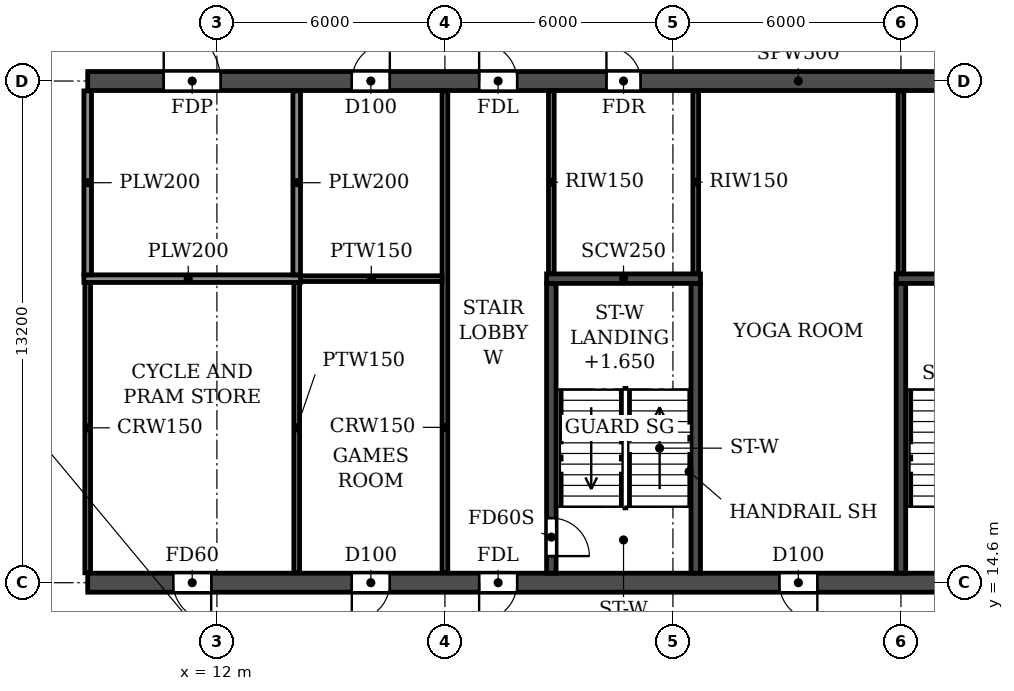
"""IFC4 building model, lengths in metres.
Left out: names, types, materials, properties, quantities, classifications, styles, units other than length and angle.
Written with IfcOpenShell. Run it as: python <this file> out.ifc"""

import sys

from ifc_helpers import new_model, si_unit, direction, frame, frame_2d, origin, place, context, subcontext, project, spatial, rectangle, extrude, element, fill, save


model = new_model("IFC4")
c1 = context("Model", 3, precision=1e-05, world=origin(), true_north=direction((0.0, 1.0)))
c2 = subcontext(c1, "Body", "Model", "MODEL_VIEW")
j1 = project(units=[si_unit("LENGTHUNIT", "METRE"), si_unit("PLANEANGLEUNIT", "RADIAN")], contexts=[c1])
p1 = place(None, origin())
s1 = spatial("IfcSite", under=j1, at=p1, CompositionType="ELEMENT")
p2 = place(p1, origin())
s2 = spatial("IfcBuilding", under=s1, at=p2, CompositionType="ELEMENT")
p3 = place(p2, frame((0.0, 0.0, 72.9)))
s3 = spatial("IfcBuildingStorey", under=s2, at=p3, CompositionType="ELEMENT", Elevation=72.9)
p4 = place(p3, frame((8.6, 14.6, 0.0), z_axis=(0.0, 0.0, 1.0), x_axis=(1.0, 0.0, 0.0)))
e1 = element("IfcWall", 1, at=p4, inside=s3, PredefinedType="SOLIDWALL", context=c2, shape_type="SweptSolid", body=[
    extrude(rectangle(XDim=84.8, YDim=0.5, at=frame_2d((42.4, 0.0))), origin(), (0.0, 0.0, 1.0), 3.06),
])
p5 = place(p4, frame((2.25, 0.0, 0.0)))
e2 = element("IfcOpeningElement", 2, at=p5, cuts=e1, PredefinedType="OPENING", context=c2, shape_type="SweptSolid", body=[
    extrude(rectangle(XDim=1.0, YDim=2.1, at=frame_2d((0.5, 1.05))), frame((0.0, 0.26, 0.0), z_axis=(0.0, -1.0, 0.0), x_axis=(1.0, 0.0, 0.0)), (0.0, 0.0, 1.0), 0.52),
])
p6 = place(p4, frame((6.95, 0.0, 0.0)))
e3 = element("IfcOpeningElement", 3, at=p6, cuts=e1, PredefinedType="OPENING", context=c2, shape_type="SweptSolid", body=[
    extrude(rectangle(XDim=1.0, YDim=2.1, at=frame_2d((0.5, 1.05))), frame((0.0, 0.26, 0.0), z_axis=(0.0, -1.0, 0.0), x_axis=(1.0, 0.0, 0.0)), (0.0, 0.0, 1.0), 0.52),
])
p7 = place(p4, frame((10.3, 0.0, 0.0)))
e4 = element("IfcOpeningElement", 4, at=p7, cuts=e1, PredefinedType="OPENING", context=c2, shape_type="SweptSolid", body=[
    extrude(rectangle(XDim=1.0, YDim=2.1, at=frame_2d((0.5, 1.05))), frame((0.0, 0.26, 0.0), z_axis=(0.0, -1.0, 0.0), x_axis=(1.0, 0.0, 0.0)), (0.0, 0.0, 1.0), 0.52),
])
p8 = place(p4, frame((18.2, 0.0, 0.0)))
e5 = element("IfcOpeningElement", 5, at=p8, cuts=e1, PredefinedType="OPENING", context=c2, shape_type="SweptSolid", body=[
    extrude(rectangle(XDim=1.0, YDim=2.1, at=frame_2d((0.5, 1.05))), frame((0.0, 0.26, 0.0), z_axis=(0.0, -1.0, 0.0), x_axis=(1.0, 0.0, 0.0)), (0.0, 0.0, 1.0), 0.52),
])
p9 = place(p4, frame((22.8, 0.0, 0.0)))
e6 = element("IfcOpeningElement", 6, at=p9, cuts=e1, PredefinedType="OPENING", context=c2, shape_type="SweptSolid", body=[
    extrude(rectangle(XDim=1.0, YDim=2.1, at=frame_2d((0.5, 1.05))), frame((0.0, 0.26, 0.0), z_axis=(0.0, -1.0, 0.0), x_axis=(1.0, 0.0, 0.0)), (0.0, 0.0, 1.0), 0.52),
])
p10 = place(p4, frame((35.4, 0.0, 0.0)))
e7 = element("IfcOpeningElement", 7, at=p10, cuts=e1, PredefinedType="OPENING", context=c2, shape_type="SweptSolid", body=[
    extrude(rectangle(XDim=1.0, YDim=2.1, at=frame_2d((0.5, 1.05))), frame((0.0, 0.26, 0.0), z_axis=(0.0, -1.0, 0.0), x_axis=(1.0, 0.0, 0.0)), (0.0, 0.0, 1.0), 0.52),
])
p11 = place(p4, frame((39.3, 0.0, 0.0)))
e8 = element("IfcOpeningElement", 8, at=p11, cuts=e1, PredefinedType="OPENING", context=c2, shape_type="SweptSolid", body=[
    extrude(rectangle(XDim=1.0, YDim=2.1, at=frame_2d((0.5, 1.05))), frame((0.0, 0.26, 0.0), z_axis=(0.0, -1.0, 0.0), x_axis=(1.0, 0.0, 0.0)), (0.0, 0.0, 1.0), 0.52),
])
p12 = place(p4, frame((41.9, 0.0, 0.0)))
e9 = element("IfcOpeningElement", 9, at=p12, cuts=e1, PredefinedType="OPENING", context=c2, shape_type="SweptSolid", body=[
    extrude(rectangle(XDim=1.0, YDim=2.1, at=frame_2d((0.5, 1.05))), frame((0.0, 0.26, 0.0), z_axis=(0.0, -1.0, 0.0), x_axis=(1.0, 0.0, 0.0)), (0.0, 0.0, 1.0), 0.52),
])
p13 = place(p4, frame((44.5, 0.0, 0.0)))
e10 = element("IfcOpeningElement", 10, at=p13, cuts=e1, PredefinedType="OPENING", context=c2, shape_type="SweptSolid", body=[
    extrude(rectangle(XDim=1.0, YDim=2.1, at=frame_2d((0.5, 1.05))), frame((0.0, 0.26, 0.0), z_axis=(0.0, -1.0, 0.0), x_axis=(1.0, 0.0, 0.0)), (0.0, 0.0, 1.0), 0.52),
])
p14 = place(p4, frame((48.4, 0.0, 0.0)))
e11 = element("IfcOpeningElement", 11, at=p14, cuts=e1, PredefinedType="OPENING", context=c2, shape_type="SweptSolid", body=[
    extrude(rectangle(XDim=1.0, YDim=2.1, at=frame_2d((0.5, 1.05))), frame((0.0, 0.26, 0.0), z_axis=(0.0, -1.0, 0.0), x_axis=(1.0, 0.0, 0.0)), (0.0, 0.0, 1.0), 0.52),
])
p15 = place(p4, frame((61.0, 0.0, 0.0)))
e12 = element("IfcOpeningElement", 12, at=p15, cuts=e1, PredefinedType="OPENING", context=c2, shape_type="SweptSolid", body=[
    extrude(rectangle(XDim=1.0, YDim=2.1, at=frame_2d((0.5, 1.05))), frame((0.0, 0.26, 0.0), z_axis=(0.0, -1.0, 0.0), x_axis=(1.0, 0.0, 0.0)), (0.0, 0.0, 1.0), 0.52),
])
p16 = place(p4, frame((65.6, 0.0, 0.0)))
e13 = element("IfcOpeningElement", 13, at=p16, cuts=e1, PredefinedType="OPENING", context=c2, shape_type="SweptSolid", body=[
    extrude(rectangle(XDim=1.0, YDim=2.1, at=frame_2d((0.5, 1.05))), frame((0.0, 0.26, 0.0), z_axis=(0.0, -1.0, 0.0), x_axis=(1.0, 0.0, 0.0)), (0.0, 0.0, 1.0), 0.52),
])
p17 = place(p4, frame((73.5, 0.0, 0.0)))
e14 = element("IfcOpeningElement", 14, at=p17, cuts=e1, PredefinedType="OPENING", context=c2, shape_type="SweptSolid", body=[
    extrude(rectangle(XDim=1.0, YDim=2.1, at=frame_2d((0.5, 1.05))), frame((0.0, 0.26, 0.0), z_axis=(0.0, -1.0, 0.0), x_axis=(1.0, 0.0, 0.0)), (0.0, 0.0, 1.0), 0.52),
])
p18 = place(p4, frame((76.55, 0.0, 0.0)))
e15 = element("IfcOpeningElement", 15, at=p18, cuts=e1, PredefinedType="OPENING", context=c2, shape_type="SweptSolid", body=[
    extrude(rectangle(XDim=1.0, YDim=2.1, at=frame_2d((0.5, 1.05))), frame((0.0, 0.26, 0.0), z_axis=(0.0, -1.0, 0.0), x_axis=(1.0, 0.0, 0.0)), (0.0, 0.0, 1.0), 0.52),
])
p19 = place(p4, frame((81.0, 0.0, 0.0)))
e16 = element("IfcOpeningElement", 16, at=p19, cuts=e1, PredefinedType="OPENING", context=c2, shape_type="SweptSolid", body=[
    extrude(rectangle(XDim=1.5, YDim=2.1, at=frame_2d((0.75, 1.05))), frame((0.0, 0.26, 0.0), z_axis=(0.0, -1.0, 0.0), x_axis=(1.0, 0.0, 0.0)), (0.0, 0.0, 1.0), 0.52),
])
p20 = place(p3, frame((8.6, 27.8, 0.0), z_axis=(0.0, 0.0, 1.0), x_axis=(1.0, 0.0, 0.0)))
e17 = element("IfcWall", 17, at=p20, inside=s3, PredefinedType="SOLIDWALL", context=c2, shape_type="SweptSolid", body=[
    extrude(rectangle(XDim=84.8, YDim=0.5, at=frame_2d((42.4, 0.0))), origin(), (0.0, 0.0, 1.0), 3.06),
])
p21 = place(p20, frame((2.0, 0.0, 0.0)))
e18 = element("IfcOpeningElement", 18, at=p21, cuts=e17, PredefinedType="OPENING", context=c2, shape_type="SweptSolid", body=[
    extrude(rectangle(XDim=1.5, YDim=2.1, at=frame_2d((0.75, 1.05))), frame((0.0, 0.26, 0.0), z_axis=(0.0, -1.0, 0.0), x_axis=(1.0, 0.0, 0.0)), (0.0, 0.0, 1.0), 0.52),
])
p22 = place(p20, frame((6.95, 0.0, 0.0)))
e19 = element("IfcOpeningElement", 19, at=p22, cuts=e17, PredefinedType="OPENING", context=c2, shape_type="SweptSolid", body=[
    extrude(rectangle(XDim=1.0, YDim=2.1, at=frame_2d((0.5, 1.05))), frame((0.0, 0.26, 0.0), z_axis=(0.0, -1.0, 0.0), x_axis=(1.0, 0.0, 0.0)), (0.0, 0.0, 1.0), 0.52),
])
p23 = place(p20, frame((10.3, 0.0, 0.0)))
e20 = element("IfcOpeningElement", 20, at=p23, cuts=e17, PredefinedType="OPENING", context=c2, shape_type="SweptSolid", body=[
    extrude(rectangle(XDim=1.0, YDim=2.1, at=frame_2d((0.5, 1.05))), frame((0.0, 0.26, 0.0), z_axis=(0.0, -1.0, 0.0), x_axis=(1.0, 0.0, 0.0)), (0.0, 0.0, 1.0), 0.52),
])
p24 = place(p20, frame((13.65, 0.0, 0.0)))
e21 = element("IfcOpeningElement", 21, at=p24, cuts=e17, PredefinedType="OPENING", context=c2, shape_type="SweptSolid", body=[
    extrude(rectangle(XDim=0.9, YDim=2.1, at=frame_2d((0.45, 1.05))), frame((0.0, 0.26, 0.0), z_axis=(0.0, -1.0, 0.0), x_axis=(1.0, 0.0, 0.0)), (0.0, 0.0, 1.0), 0.52),
])
p25 = place(p20, frame((22.85, 0.0, 0.0)))
e22 = element("IfcOpeningElement", 22, at=p25, cuts=e17, PredefinedType="OPENING", context=c2, shape_type="SweptSolid", body=[
    extrude(rectangle(XDim=0.9, YDim=2.1, at=frame_2d((0.45, 1.05))), frame((0.0, 0.26, 0.0), z_axis=(0.0, -1.0, 0.0), x_axis=(1.0, 0.0, 0.0)), (0.0, 0.0, 1.0), 0.52),
])
p26 = place(p20, frame((26.0, 0.0, 0.0)))
e23 = element("IfcOpeningElement", 23, at=p26, cuts=e17, PredefinedType="OPENING", context=c2, shape_type="SweptSolid", body=[
    extrude(rectangle(XDim=1.0, YDim=2.1, at=frame_2d((0.5, 1.05))), frame((0.0, 0.26, 0.0), z_axis=(0.0, -1.0, 0.0), x_axis=(1.0, 0.0, 0.0)), (0.0, 0.0, 1.0), 0.52),
])
p27 = place(p20, frame((31.2, 0.0, 0.0)))
e24 = element("IfcOpeningElement", 24, at=p27, cuts=e17, PredefinedType="OPENING", context=c2, shape_type="SweptSolid", body=[
    extrude(rectangle(XDim=1.0, YDim=2.1, at=frame_2d((0.5, 1.05))), frame((0.0, 0.26, 0.0), z_axis=(0.0, -1.0, 0.0), x_axis=(1.0, 0.0, 0.0)), (0.0, 0.0, 1.0), 0.52),
])
p28 = place(p20, frame((39.0, 0.0, 0.0)))
e25 = element("IfcOpeningElement", 25, at=p28, cuts=e17, PredefinedType="OPENING", context=c2, shape_type="SweptSolid", body=[
    extrude(rectangle(XDim=1.0, YDim=2.1, at=frame_2d((0.5, 1.05))), frame((0.0, 0.26, 0.0), z_axis=(0.0, -1.0, 0.0), x_axis=(1.0, 0.0, 0.0)), (0.0, 0.0, 1.0), 0.52),
])
p29 = place(p20, frame((41.9, 0.0, 0.0)))
e26 = element("IfcOpeningElement", 26, at=p29, cuts=e17, PredefinedType="OPENING", context=c2, shape_type="SweptSolid", body=[
    extrude(rectangle(XDim=1.0, YDim=2.1, at=frame_2d((0.5, 1.05))), frame((0.0, 0.26, 0.0), z_axis=(0.0, -1.0, 0.0), x_axis=(1.0, 0.0, 0.0)), (0.0, 0.0, 1.0), 0.52),
])
p30 = place(p20, frame((44.8, 0.0, 0.0)))
e27 = element("IfcOpeningElement", 27, at=p30, cuts=e17, PredefinedType="OPENING", context=c2, shape_type="SweptSolid", body=[
    extrude(rectangle(XDim=1.0, YDim=2.1, at=frame_2d((0.5, 1.05))), frame((0.0, 0.26, 0.0), z_axis=(0.0, -1.0, 0.0), x_axis=(1.0, 0.0, 0.0)), (0.0, 0.0, 1.0), 0.52),
])
p31 = place(p20, frame((48.7, 0.0, 0.0)))
e28 = element("IfcOpeningElement", 28, at=p31, cuts=e17, PredefinedType="OPENING", context=c2, shape_type="SweptSolid", body=[
    extrude(rectangle(XDim=1.0, YDim=2.1, at=frame_2d((0.5, 1.05))), frame((0.0, 0.26, 0.0), z_axis=(0.0, -1.0, 0.0), x_axis=(1.0, 0.0, 0.0)), (0.0, 0.0, 1.0), 0.52),
])
p32 = place(p20, frame((55.2, 0.0, 0.0)))
e29 = element("IfcOpeningElement", 29, at=p32, cuts=e17, PredefinedType="OPENING", context=c2, shape_type="SweptSolid", body=[
    extrude(rectangle(XDim=1.0, YDim=2.1, at=frame_2d((0.5, 1.05))), frame((0.0, 0.26, 0.0), z_axis=(0.0, -1.0, 0.0), x_axis=(1.0, 0.0, 0.0)), (0.0, 0.0, 1.0), 0.52),
])
p33 = place(p20, frame((61.05, 0.0, 0.0)))
e30 = element("IfcOpeningElement", 30, at=p33, cuts=e17, PredefinedType="OPENING", context=c2, shape_type="SweptSolid", body=[
    extrude(rectangle(XDim=0.9, YDim=2.1, at=frame_2d((0.45, 1.05))), frame((0.0, 0.26, 0.0), z_axis=(0.0, -1.0, 0.0), x_axis=(1.0, 0.0, 0.0)), (0.0, 0.0, 1.0), 0.52),
])
p34 = place(p20, frame((70.25, 0.0, 0.0)))
e31 = element("IfcOpeningElement", 31, at=p34, cuts=e17, PredefinedType="OPENING", context=c2, shape_type="SweptSolid", body=[
    extrude(rectangle(XDim=0.9, YDim=2.1, at=frame_2d((0.45, 1.05))), frame((0.0, 0.26, 0.0), z_axis=(0.0, -1.0, 0.0), x_axis=(1.0, 0.0, 0.0)), (0.0, 0.0, 1.0), 0.52),
])
p35 = place(p20, frame((73.5, 0.0, 0.0)))
e32 = element("IfcOpeningElement", 32, at=p35, cuts=e17, PredefinedType="OPENING", context=c2, shape_type="SweptSolid", body=[
    extrude(rectangle(XDim=1.0, YDim=2.1, at=frame_2d((0.5, 1.05))), frame((0.0, 0.26, 0.0), z_axis=(0.0, -1.0, 0.0), x_axis=(1.0, 0.0, 0.0)), (0.0, 0.0, 1.0), 0.52),
])
p36 = place(p20, frame((76.25, 0.0, 0.0)))
e33 = element("IfcOpeningElement", 33, at=p36, cuts=e17, PredefinedType="OPENING", context=c2, shape_type="SweptSolid", body=[
    extrude(rectangle(XDim=1.0, YDim=2.1, at=frame_2d((0.5, 1.05))), frame((0.0, 0.26, 0.0), z_axis=(0.0, -1.0, 0.0), x_axis=(1.0, 0.0, 0.0)), (0.0, 0.0, 1.0), 0.52),
])
p37 = place(p20, frame((80.95, 0.0, 0.0)))
e34 = element("IfcOpeningElement", 34, at=p37, cuts=e17, PredefinedType="OPENING", context=c2, shape_type="SweptSolid", body=[
    extrude(rectangle(XDim=1.0, YDim=2.1, at=frame_2d((0.5, 1.05))), frame((0.0, 0.26, 0.0), z_axis=(0.0, -1.0, 0.0), x_axis=(1.0, 0.0, 0.0)), (0.0, 0.0, 1.0), 0.52),
])
p38 = place(p3, frame((30.0, 14.85, 0.0), z_axis=(0.0, 0.0, 1.0), x_axis=(0.0, 1.0, 0.0)))
e35 = element("IfcWall", 35, at=p38, inside=s3, PredefinedType="SOLIDWALL", context=c2, shape_type="SweptSolid", body=[
    extrude(rectangle(XDim=7.625, YDim=0.25, at=frame_2d((3.812, 0.0))), origin(), (0.0, 0.0, 1.0), 3.06),
])
p39 = place(p3, frame((29.875, 22.6, 0.0), z_axis=(0.0, 0.0, 1.0), x_axis=(1.0, 0.0, 0.0)))
e36 = element("IfcWall", 36, at=p39, inside=s3, PredefinedType="SOLIDWALL", context=c2, shape_type="SweptSolid", body=[
    extrude(rectangle(XDim=4.05, YDim=0.25, at=frame_2d((2.025, 0.0))), origin(), (0.0, 0.0, 1.0), 3.06),
])
p40 = place(p3, frame((20.8, 14.85, 0.0), z_axis=(0.0, 0.0, 1.0), x_axis=(0.0, 1.0, 0.0)))
e37 = element("IfcWall", 37, at=p40, inside=s3, PredefinedType="SOLIDWALL", context=c2, shape_type="SweptSolid", body=[
    extrude(rectangle(XDim=7.625, YDim=0.25, at=frame_2d((3.812, 0.0))), origin(), (0.0, 0.0, 1.0), 3.06),
])
p41 = place(p40, frame((0.45, 0.0, 0.0)))
e38 = element("IfcOpeningElement", 38, at=p41, cuts=e37, PredefinedType="OPENING", context=c2, shape_type="SweptSolid", body=[
    extrude(rectangle(XDim=1.0, YDim=2.1, at=frame_2d((0.5, 1.05))), frame((0.0, 0.135, 0.0), z_axis=(0.0, -1.0, 0.0), x_axis=(1.0, 0.0, 0.0)), (0.0, 0.0, 1.0), 0.27),
])
p42 = place(p3, frame((24.6, 14.85, 0.0), z_axis=(0.0, 0.0, 1.0), x_axis=(0.0, 1.0, 0.0)))
e39 = element("IfcWall", 39, at=p42, inside=s3, PredefinedType="SOLIDWALL", context=c2, shape_type="SweptSolid", body=[
    extrude(rectangle(XDim=7.625, YDim=0.25, at=frame_2d((3.812, 0.0))), origin(), (0.0, 0.0, 1.0), 3.06),
])
p43 = place(p3, frame((20.675, 22.6, 0.0), z_axis=(0.0, 0.0, 1.0), x_axis=(1.0, 0.0, 0.0)))
e40 = element("IfcWall", 40, at=p43, inside=s3, PredefinedType="SOLIDWALL", context=c2, shape_type="SweptSolid", body=[
    extrude(rectangle(XDim=4.05, YDim=0.25, at=frame_2d((2.025, 0.0))), origin(), (0.0, 0.0, 1.0), 3.06),
])
p44 = place(p3, frame((8.6, 14.86, 0.0), z_axis=(0.0, 0.0, 1.0), x_axis=(0.0, 1.0, 0.0)))
e41 = element("IfcWall", 41, at=p44, inside=s3, PredefinedType="PARTITIONING", context=c2, shape_type="SweptSolid", body=[
    extrude(rectangle(XDim=7.64, YDim=0.15, at=frame_2d((3.82, 0.0))), origin(), (0.0, 0.0, 1.0), 3.06),
])
p45 = place(p3, frame((18.0, 14.86, 0.0), z_axis=(0.0, 0.0, 1.0), x_axis=(0.0, 1.0, 0.0)))
e42 = element("IfcWall", 42, at=p45, inside=s3, PredefinedType="PARTITIONING", context=c2, shape_type="SweptSolid", body=[
    extrude(rectangle(XDim=12.68, YDim=0.15, at=frame_2d((6.34, 0.0))), origin(), (0.0, 0.0, 1.0), 3.06),
])
p46 = place(p3, frame((14.0, 22.6, 0.0), z_axis=(0.0, 0.0, 1.0), x_axis=(1.0, 0.0, 0.0)))
e43 = element("IfcWall", 43, at=p46, inside=s3, PredefinedType="PARTITIONING", context=c2, shape_type="SweptSolid", body=[
    extrude(rectangle(XDim=3.925, YDim=0.15, at=frame_2d((1.962, 0.0))), origin(), (0.0, 0.0, 1.0), 3.06),
])
p47 = place(p3, frame((14.1, 14.86, 0.0), z_axis=(0.0, 0.0, 1.0), x_axis=(0.0, 1.0, 0.0)))
e44 = element("IfcWall", 44, at=p47, inside=s3, PredefinedType="PARTITIONING", context=c2, shape_type="SweptSolid", body=[
    extrude(rectangle(XDim=7.64, YDim=0.15, at=frame_2d((3.82, 0.0))), origin(), (0.0, 0.0, 1.0), 3.06),
])
p48 = place(p3, frame((8.5, 22.6, 0.0), z_axis=(0.0, 0.0, 1.0), x_axis=(1.0, 0.0, 0.0)))
e45 = element("IfcWall", 45, at=p48, inside=s3, PredefinedType="PARTITIONING", context=c2, shape_type="SweptSolid", body=[
    extrude(rectangle(XDim=5.7, YDim=0.2, at=frame_2d((2.85, 0.0))), origin(), (0.0, 0.0, 1.0), 3.06),
])
for number, where, z_axis, x_axis in (
    (46, (8.6, 22.7, 0.0), (0.0, 0.0, 1.0), (0.0, 1.0, 0.0)),
    (47, (14.1, 22.7, 0.0), (0.0, 0.0, 1.0), (0.0, 1.0, 0.0)),
):
    element("IfcWall", number, at=place(p3, frame(where, z_axis=z_axis, x_axis=x_axis)), inside=s3, PredefinedType="PARTITIONING", context=c2, shape_type="SweptSolid", body=[
        extrude(rectangle(XDim=4.84, YDim=0.2, at=frame_2d((2.42, 0.0))), origin(), (0.0, 0.0, 1.0), 3.06),
    ])
for number, where, z_axis, x_axis in (
    (48, (20.8, 22.735, 0.0), (0.0, 0.0, 1.0), (0.0, 1.0, 0.0)),
    (49, (24.6, 22.735, 0.0), (0.0, 0.0, 1.0), (0.0, 1.0, 0.0)),
    (50, (30.0, 22.735, 0.0), (0.0, 0.0, 1.0), (0.0, 1.0, 0.0)),
):
    element("IfcWall", number, at=place(p3, frame(where, z_axis=z_axis, x_axis=x_axis)), inside=s3, PredefinedType="PARTITIONING", context=c2, shape_type="SweptSolid", body=[
        extrude(rectangle(XDim=4.805, YDim=0.15, at=frame_2d((2.402, 0.0))), origin(), (0.0, 0.0, 1.0), 3.06),
    ])
p49 = place(p21, origin())
e51 = element("IfcDoor", 51, at=p49, inside=s3, OperationType="DOUBLE_DOOR_SINGLE_SWING", PredefinedType="DOOR", context=c2, shape_type="SweptSolid", body=[
    extrude(rectangle(XDim=1.5, YDim=2.1, at=frame_2d((0.75, 1.05))), frame((0.0, 0.025, 0.0), z_axis=(0.0, -1.0, 0.0), x_axis=(1.0, 0.0, 0.0)), (0.0, 0.0, 1.0), 0.05),
])
fill(e18, e51)
p50 = place(p22, origin())
e52 = element("IfcDoor", 52, at=p50, inside=s3, OperationType="SINGLE_SWING_RIGHT", PredefinedType="DOOR", context=c2, shape_type="SweptSolid", body=[
    extrude(rectangle(XDim=1.0, YDim=2.1, at=frame_2d((0.5, 1.05))), frame((0.0, 0.025, 0.0), z_axis=(0.0, -1.0, 0.0), x_axis=(1.0, 0.0, 0.0)), (0.0, 0.0, 1.0), 0.05),
])
fill(e19, e52)
p51 = place(p23, origin())
e53 = element("IfcDoor", 53, at=p51, inside=s3, OperationType="SINGLE_SWING_LEFT", PredefinedType="DOOR", context=c2, shape_type="SweptSolid", body=[
    extrude(rectangle(XDim=1.0, YDim=2.1, at=frame_2d((0.5, 1.05))), frame((0.0, 0.025, 0.0), z_axis=(0.0, -1.0, 0.0), x_axis=(1.0, 0.0, 0.0)), (0.0, 0.0, 1.0), 0.05),
])
fill(e20, e53)
p52 = place(p24, origin())
e54 = element("IfcDoor", 54, at=p52, inside=s3, OperationType="SINGLE_SWING_LEFT", PredefinedType="DOOR", context=c2, shape_type="SweptSolid", body=[
    extrude(rectangle(XDim=0.9, YDim=2.1, at=frame_2d((0.45, 1.05))), frame((0.0, 0.025, 0.0), z_axis=(0.0, -1.0, 0.0), x_axis=(1.0, 0.0, 0.0)), (0.0, 0.0, 1.0), 0.05),
])
fill(e21, e54)
p53 = place(p5, frame((1.0, 0.0, 0.0), z_axis=(0.0, 0.0, 1.0), x_axis=(-1.0, 0.0, 0.0)))
e55 = element("IfcDoor", 55, at=p53, inside=s3, OperationType="SINGLE_SWING_LEFT", PredefinedType="DOOR", context=c2, shape_type="SweptSolid", body=[
    extrude(rectangle(XDim=1.0, YDim=2.1, at=frame_2d((0.5, 1.05))), frame((0.0, 0.025, 0.0), z_axis=(0.0, -1.0, 0.0), x_axis=(1.0, 0.0, 0.0)), (0.0, 0.0, 1.0), 0.05),
])
fill(e2, e55)
p54 = place(p6, frame((1.0, 0.0, 0.0), z_axis=(0.0, 0.0, 1.0), x_axis=(-1.0, 0.0, 0.0)))
e56 = element("IfcDoor", 56, at=p54, inside=s3, OperationType="SINGLE_SWING_RIGHT", PredefinedType="DOOR", context=c2, shape_type="SweptSolid", body=[
    extrude(rectangle(XDim=1.0, YDim=2.1, at=frame_2d((0.5, 1.05))), frame((0.0, 0.025, 0.0), z_axis=(0.0, -1.0, 0.0), x_axis=(1.0, 0.0, 0.0)), (0.0, 0.0, 1.0), 0.05),
])
fill(e3, e56)
p55 = place(p7, frame((1.0, 0.0, 0.0), z_axis=(0.0, 0.0, 1.0), x_axis=(-1.0, 0.0, 0.0)))
e57 = element("IfcDoor", 57, at=p55, inside=s3, OperationType="SINGLE_SWING_RIGHT", PredefinedType="DOOR", context=c2, shape_type="SweptSolid", body=[
    extrude(rectangle(XDim=1.0, YDim=2.1, at=frame_2d((0.5, 1.05))), frame((0.0, 0.025, 0.0), z_axis=(0.0, -1.0, 0.0), x_axis=(1.0, 0.0, 0.0)), (0.0, 0.0, 1.0), 0.05),
])
fill(e4, e57)
p56 = place(p8, frame((1.0, 0.0, 0.0), z_axis=(0.0, 0.0, 1.0), x_axis=(-1.0, 0.0, 0.0)))
e58 = element("IfcDoor", 58, at=p56, inside=s3, OperationType="SINGLE_SWING_LEFT", PredefinedType="DOOR", context=c2, shape_type="SweptSolid", body=[
    extrude(rectangle(XDim=1.0, YDim=2.1, at=frame_2d((0.5, 1.05))), frame((0.0, 0.025, 0.0), z_axis=(0.0, -1.0, 0.0), x_axis=(1.0, 0.0, 0.0)), (0.0, 0.0, 1.0), 0.05),
])
fill(e5, e58)
p57 = place(p41, frame((1.0, 0.0, 0.0), z_axis=(0.0, 0.0, 1.0), x_axis=(-1.0, 0.0, 0.0)))
e59 = element("IfcDoor", 59, at=p57, inside=s3, OperationType="SINGLE_SWING_RIGHT", PredefinedType="DOOR", context=c2, shape_type="SweptSolid", body=[
    extrude(rectangle(XDim=1.0, YDim=2.1, at=frame_2d((0.5, 1.05))), frame((0.0, 0.025, 0.0), z_axis=(0.0, -1.0, 0.0), x_axis=(1.0, 0.0, 0.0)), (0.0, 0.0, 1.0), 0.05),
])
fill(e38, e59)
save(model, sys.argv[1])
